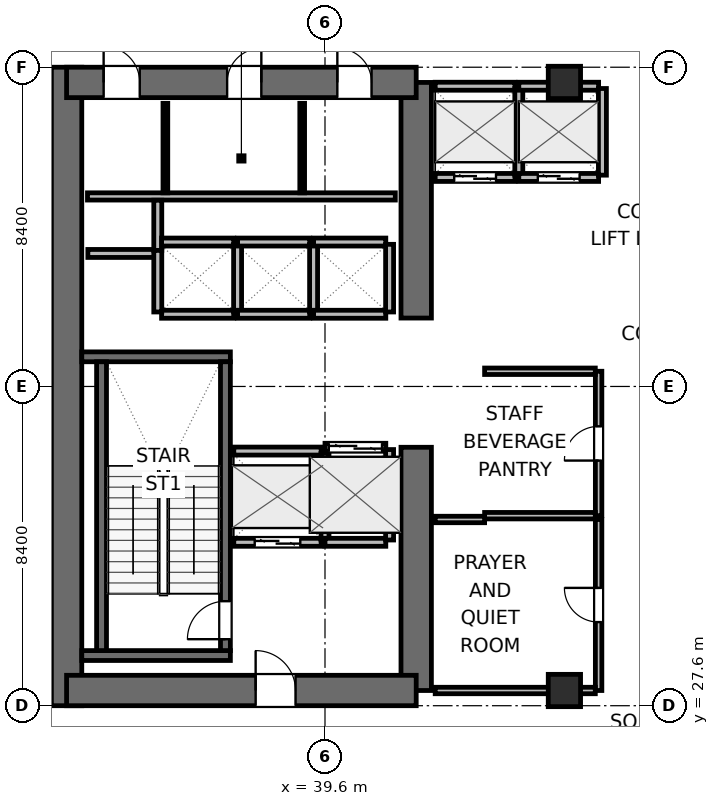
"""IFC4 building model, lengths in metres.
Left out: names, types, materials, properties, quantities, classifications, styles, units other than length and angle.
Written with IfcOpenShell. Run it as: python <this file> out.ifc"""

import sys

from ifc_helpers import new_model, si_unit, direction, frame, frame_2d, origin, origin_2d, place, context, subcontext, project, spatial, rectangle, extrude, element, fill, save


model = new_model("IFC4")
c1 = context("Model", 3, precision=1e-05, world=origin(), true_north=direction((0.0, 1.0)))
c2 = subcontext(c1, "Body", "Model", "MODEL_VIEW")
j1 = project(units=[si_unit("LENGTHUNIT", "METRE"), si_unit("PLANEANGLEUNIT", "RADIAN")], contexts=[c1])
p1 = place(None, origin())
s1 = spatial("IfcSite", under=j1, at=p1, CompositionType="ELEMENT")
p2 = place(p1, origin())
s2 = spatial("IfcBuilding", under=s1, at=p2, CompositionType="ELEMENT")
p3 = place(p2, frame((0.0, 0.0, 125.4)))
s3 = spatial("IfcBuildingStorey", under=s2, at=p3, CompositionType="ELEMENT", Elevation=125.4)
p4 = place(p3, frame((32.8, 27.6, 0.0), z_axis=(0.0, 0.0, 1.0), x_axis=(0.0, 1.0, 0.0)))
e1 = element("IfcWall", 1, at=p4, inside=s3, PredefinedType="SHEAR", context=c2, shape_type="SweptSolid", body=[
    extrude(rectangle(XDim=16.8, YDim=0.8, at=frame_2d((8.4, 0.0))), origin(), (0.0, 0.0, 1.0), 4.5),
])
p5 = place(p3, frame((42.0, 28.0, 0.0), z_axis=(0.0, 0.0, 1.0), x_axis=(0.0, 1.0, 0.0)))
e2 = element("IfcWall", 2, at=p5, inside=s3, PredefinedType="SHEAR", context=c2, shape_type="SweptSolid", body=[
    extrude(rectangle(XDim=6.4, YDim=0.8, at=frame_2d((3.2, 0.0))), origin(), (0.0, 0.0, 1.0), 4.5),
])
p6 = place(p3, frame((42.0, 37.8, 0.0), z_axis=(0.0, 0.0, 1.0), x_axis=(0.0, 1.0, 0.0)))
e3 = element("IfcWall", 3, at=p6, inside=s3, PredefinedType="SHEAR", context=c2, shape_type="SweptSolid", body=[
    extrude(rectangle(XDim=6.2, YDim=0.8, at=frame_2d((3.1, 0.0))), origin(), (0.0, 0.0, 1.0), 4.5),
])
p7 = place(p3, frame((32.8, 28.0, 0.0), z_axis=(0.0, 0.0, 1.0), x_axis=(1.0, 0.0, 0.0)))
e4 = element("IfcWall", 4, at=p7, inside=s3, PredefinedType="SHEAR", context=c2, shape_type="SweptSolid", body=[
    extrude(rectangle(XDim=9.2, YDim=0.8, at=frame_2d((4.6, 0.0))), origin(), (0.0, 0.0, 1.0), 4.5),
])
p8 = place(p7, frame((4.975, 0.0, 0.0)))
e5 = element("IfcOpeningElement", 5, at=p8, cuts=e4, PredefinedType="OPENING", context=c2, shape_type="SweptSolid", body=[
    extrude(rectangle(XDim=1.05, YDim=2.04, at=frame_2d((0.525, 1.02))), frame((0.0, 0.41, 0.0), z_axis=(0.0, -1.0, 0.0), x_axis=(1.0, 0.0, 0.0)), (0.0, 0.0, 1.0), 0.82),
])
p9 = place(p3, frame((32.8, 44.0, 0.0), z_axis=(0.0, 0.0, 1.0), x_axis=(1.0, 0.0, 0.0)))
e6 = element("IfcWall", 6, at=p9, inside=s3, PredefinedType="SHEAR", context=c2, shape_type="SweptSolid", body=[
    extrude(rectangle(XDim=9.2, YDim=0.8, at=frame_2d((4.6, 0.0))), origin(), (0.0, 0.0, 1.0), 4.5),
])
p10 = place(p9, frame((0.975, 0.0, 0.0)))
e7 = element("IfcOpeningElement", 7, at=p10, cuts=e6, PredefinedType="OPENING", context=c2, shape_type="SweptSolid", body=[
    extrude(rectangle(XDim=0.95, YDim=2.04, at=frame_2d((0.475, 1.02))), frame((0.0, 0.41, 0.0), z_axis=(0.0, -1.0, 0.0), x_axis=(1.0, 0.0, 0.0)), (0.0, 0.0, 1.0), 0.82),
])
p11 = place(p9, frame((4.225, 0.0, 0.0)))
e8 = element("IfcOpeningElement", 8, at=p11, cuts=e6, PredefinedType="OPENING", context=c2, shape_type="SweptSolid", body=[
    extrude(rectangle(XDim=0.9, YDim=2.02, at=frame_2d((0.45, 1.01))), frame((0.0, 0.41, 0.0), z_axis=(0.0, -1.0, 0.0), x_axis=(1.0, 0.0, 0.0)), (0.0, 0.0, 1.0), 0.82),
])
p12 = place(p9, frame((7.125, 0.0, 0.0)))
e9 = element("IfcOpeningElement", 9, at=p12, cuts=e6, PredefinedType="OPENING", context=c2, shape_type="SweptSolid", body=[
    extrude(rectangle(XDim=0.9, YDim=2.02, at=frame_2d((0.45, 1.01))), frame((0.0, 0.41, 0.0), z_axis=(0.0, -1.0, 0.0), x_axis=(1.0, 0.0, 0.0)), (0.0, 0.0, 1.0), 0.82),
])
for number, where, z_axis, x_axis in (
    (10, (33.2, 28.92, 0.0), (0.0, 0.0, 1.0), (1.0, 0.0, 0.0)),
    (11, (33.2, 36.78, 0.0), (0.0, 0.0, 1.0), (1.0, 0.0, 0.0)),
):
    element("IfcWall", number, at=place(p3, frame(where, z_axis=z_axis, x_axis=x_axis)), inside=s3, PredefinedType="SHEAR", context=c2, shape_type="SweptSolid", body=[
        extrude(rectangle(XDim=3.91, YDim=0.26, at=frame_2d((1.955, 0.0))), origin(), (0.0, 0.0, 1.0), 4.5),
    ])
p13 = place(p3, frame((33.72, 29.05, 0.0), z_axis=(0.0, 0.0, 1.0), x_axis=(0.0, 1.0, 0.0)))
e12 = element("IfcWall", 12, at=p13, inside=s3, PredefinedType="SHEAR", context=c2, shape_type="SweptSolid", body=[
    extrude(rectangle(XDim=7.6, YDim=0.26, at=frame_2d((3.8, 0.0))), origin(), (0.0, 0.0, 1.0), 4.5),
])
p14 = place(p3, frame((36.98, 29.05, 0.0), z_axis=(0.0, 0.0, 1.0), x_axis=(0.0, 1.0, 0.0)))
e13 = element("IfcWall", 13, at=p14, inside=s3, PredefinedType="SHEAR", context=c2, shape_type="SweptSolid", body=[
    extrude(rectangle(XDim=7.6, YDim=0.26, at=frame_2d((3.8, 0.0))), origin(), (0.0, 0.0, 1.0), 4.5),
])
p15 = place(p14, frame((0.3, 0.0, 0.0)))
e14 = element("IfcOpeningElement", 14, at=p15, cuts=e13, PredefinedType="OPENING", context=c2, shape_type="SweptSolid", body=[
    extrude(rectangle(XDim=1.0, YDim=2.04, at=frame_2d((0.5, 1.02))), frame((0.0, 0.14, 0.0), z_axis=(0.0, -1.0, 0.0), x_axis=(1.0, 0.0, 0.0)), (0.0, 0.0, 1.0), 0.28),
])
for number, where, z_axis, x_axis in (
    (15, (45.9, 28.0, 0.0), (0.0, 0.0, 1.0), (1.0, 0.0, 0.0)),
    (16, (45.9, 44.0, 0.0), (0.0, 0.0, 1.0), (1.0, 0.0, 0.0)),
):
    element("IfcColumn", number, at=place(p3, frame(where, z_axis=z_axis, x_axis=x_axis)), inside=s3, PredefinedType="COLUMN", context=c2, shape_type="SweptSolid", body=[
        extrude(rectangle(XDim=0.85, YDim=0.85, at=origin_2d()), origin(), (0.0, 0.0, 1.0), 4.5),
    ])
p16 = place(p3, frame((33.35, 41.0, 0.0), z_axis=(0.0, 0.0, 1.0), x_axis=(1.0, 0.0, 0.0)))
e17 = element("IfcWall", 17, at=p16, inside=s3, PredefinedType="PLUMBINGWALL", context=c2, shape_type="SweptSolid", body=[
    extrude(rectangle(XDim=8.1, YDim=0.19, at=frame_2d((4.05, 0.0))), origin(), (0.0, 0.0, 1.0), 4.24),
])
for number, where, z_axis, x_axis in (
    (18, (35.4, 41.095, 0.0), (0.0, 0.0, 1.0), (0.0, 1.0, 0.0)),
    (19, (39.0, 41.095, 0.0), (0.0, 0.0, 1.0), (0.0, 1.0, 0.0)),
):
    element("IfcWall", number, at=place(p3, frame(where, z_axis=z_axis, x_axis=x_axis)), inside=s3, PredefinedType="PARTITIONING", context=c2, shape_type="SweptSolid", body=[
        extrude(rectangle(XDim=2.355, YDim=0.125, at=frame_2d((1.177, 0.0))), origin(), (0.0, 0.0, 1.0), 4.24),
    ])
p17 = place(p3, frame((33.36, 39.5, 0.0), z_axis=(0.0, 0.0, 1.0), x_axis=(1.0, 0.0, 0.0)))
e20 = element("IfcWall", 20, at=p17, inside=s3, PredefinedType="PARTITIONING", context=c2, shape_type="SweptSolid", body=[
    extrude(rectangle(XDim=1.86, YDim=0.21, at=frame_2d((0.93, 0.0))), origin(), (0.0, 0.0, 1.0), 4.24),
])
p18 = place(p3, frame((35.2, 39.58, 0.0), z_axis=(0.0, 0.0, 1.0), x_axis=(0.0, 1.0, 0.0)))
e21 = element("IfcWall", 21, at=p18, inside=s3, PredefinedType="PARTITIONING", context=c2, shape_type="SweptSolid", body=[
    extrude(rectangle(XDim=1.32, YDim=0.21, at=frame_2d((0.66, 0.0))), origin(), (0.0, 0.0, 1.0), 4.24),
])
p19 = place(p3, frame((37.2, 31.9, 0.0), z_axis=(0.0, 0.0, 1.0), x_axis=(1.0, 0.0, 0.0)))
e22 = element("IfcWall", 22, at=p19, inside=s3, PredefinedType="PARTITIONING", context=c2, shape_type="SweptSolid", body=[
    extrude(rectangle(XDim=2.3, YDim=0.21, at=frame_2d((1.15, 0.0))), origin(), (0.0, 0.0, 1.0), 4.24),
])
p20 = place(p19, frame((0.55, 0.0, 0.0)))
e23 = element("IfcOpeningElement", 23, at=p20, cuts=e22, PredefinedType="OPENING", context=c2, shape_type="SweptSolid", body=[
    extrude(rectangle(XDim=1.2, YDim=2.04, at=frame_2d((0.6, 1.02))), frame((0.0, 0.115, 0.0), z_axis=(0.0, -1.0, 0.0), x_axis=(1.0, 0.0, 0.0)), (0.0, 0.0, 1.0), 0.23),
])
p21 = place(p3, frame((37.2, 34.3, 0.0), z_axis=(0.0, 0.0, 1.0), x_axis=(1.0, 0.0, 0.0)))
e24 = element("IfcWall", 24, at=p21, inside=s3, PredefinedType="PARTITIONING", context=c2, shape_type="SweptSolid", body=[
    extrude(rectangle(XDim=2.3, YDim=0.21, at=frame_2d((1.15, 0.0))), origin(), (0.0, 0.0, 1.0), 4.24),
])
p22 = place(p3, frame((39.6, 31.96, 0.0), z_axis=(0.0, 0.0, 1.0), x_axis=(0.0, 1.0, 0.0)))
e25 = element("IfcWall", 25, at=p22, inside=s3, PredefinedType="PARTITIONING", context=c2, shape_type="SweptSolid", body=[
    extrude(rectangle(XDim=2.28, YDim=0.21, at=frame_2d((1.14, 0.0))), origin(), (0.0, 0.0, 1.0), 4.24),
])
p23 = place(p3, frame((39.6, 34.4, 0.0), z_axis=(0.0, 0.0, 1.0), x_axis=(1.0, 0.0, 0.0)))
e26 = element("IfcWall", 26, at=p23, inside=s3, PredefinedType="PARTITIONING", context=c2, shape_type="SweptSolid", body=[
    extrude(rectangle(XDim=1.6, YDim=0.21, at=frame_2d((0.8, 0.0))), origin(), (0.0, 0.0, 1.0), 4.24),
])
p24 = place(p23, frame((0.1, 0.0, 0.0)))
e27 = element("IfcOpeningElement", 27, at=p24, cuts=e26, PredefinedType="OPENING", context=c2, shape_type="SweptSolid", body=[
    extrude(rectangle(XDim=1.4, YDim=2.06, at=frame_2d((0.7, 1.03))), frame((0.0, 0.115, 0.0), z_axis=(0.0, -1.0, 0.0), x_axis=(1.0, 0.0, 0.0)), (0.0, 0.0, 1.0), 0.23),
])
p25 = place(p3, frame((39.6, 31.9, 0.0), z_axis=(0.0, 0.0, 1.0), x_axis=(1.0, 0.0, 0.0)))
e28 = element("IfcWall", 28, at=p25, inside=s3, PredefinedType="PARTITIONING", context=c2, shape_type="SweptSolid", body=[
    extrude(rectangle(XDim=1.6, YDim=0.21, at=frame_2d((0.8, 0.0))), origin(), (0.0, 0.0, 1.0), 4.24),
])
p26 = place(p3, frame((41.3, 31.96, 0.0), z_axis=(0.0, 0.0, 1.0), x_axis=(0.0, 1.0, 0.0)))
e29 = element("IfcWall", 29, at=p26, inside=s3, PredefinedType="PARTITIONING", context=c2, shape_type="SweptSolid", body=[
    extrude(rectangle(XDim=2.38, YDim=0.21, at=frame_2d((1.19, 0.0))), origin(), (0.0, 0.0, 1.0), 4.24),
])
p27 = place(p3, frame((42.5, 41.5, 0.0), z_axis=(0.0, 0.0, 1.0), x_axis=(1.0, 0.0, 0.0)))
e30 = element("IfcWall", 30, at=p27, inside=s3, PredefinedType="PARTITIONING", context=c2, shape_type="SweptSolid", body=[
    extrude(rectangle(XDim=2.1, YDim=0.21, at=frame_2d((1.05, 0.0))), origin(), (0.0, 0.0, 1.0), 4.24),
])
p28 = place(p27, frame((0.5, 0.0, 0.0)))
e31 = element("IfcOpeningElement", 31, at=p28, cuts=e30, PredefinedType="OPENING", context=c2, shape_type="SweptSolid", body=[
    extrude(rectangle(XDim=1.1, YDim=2.04, at=frame_2d((0.55, 1.02))), frame((0.0, 0.115, 0.0), z_axis=(0.0, -1.0, 0.0), x_axis=(1.0, 0.0, 0.0)), (0.0, 0.0, 1.0), 0.23),
])
p29 = place(p3, frame((42.5, 43.9, 0.0), z_axis=(0.0, 0.0, 1.0), x_axis=(1.0, 0.0, 0.0)))
e32 = element("IfcWall", 32, at=p29, inside=s3, PredefinedType="PARTITIONING", context=c2, shape_type="SweptSolid", body=[
    extrude(rectangle(XDim=2.1, YDim=0.21, at=frame_2d((1.05, 0.0))), origin(), (0.0, 0.0, 1.0), 3.125),
])
p30 = place(p3, frame((44.7, 41.56, 0.0), z_axis=(0.0, 0.0, 1.0), x_axis=(0.0, 1.0, 0.0)))
e33 = element("IfcWall", 33, at=p30, inside=s3, PredefinedType="PARTITIONING", context=c2, shape_type="SweptSolid", body=[
    extrude(rectangle(XDim=2.28, YDim=0.21, at=frame_2d((1.14, 0.0))), origin(), (0.0, 0.0, 1.0), 4.24),
])
p31 = place(p3, frame((44.7, 41.5, 0.0), z_axis=(0.0, 0.0, 1.0), x_axis=(1.0, 0.0, 0.0)))
e34 = element("IfcWall", 34, at=p31, inside=s3, PredefinedType="PARTITIONING", context=c2, shape_type="SweptSolid", body=[
    extrude(rectangle(XDim=2.1, YDim=0.21, at=frame_2d((1.05, 0.0))), origin(), (0.0, 0.0, 1.0), 4.24),
])
p32 = place(p31, frame((0.5, 0.0, 0.0)))
e35 = element("IfcOpeningElement", 35, at=p32, cuts=e34, PredefinedType="OPENING", context=c2, shape_type="SweptSolid", body=[
    extrude(rectangle(XDim=1.1, YDim=2.04, at=frame_2d((0.55, 1.02))), frame((0.0, 0.115, 0.0), z_axis=(0.0, -1.0, 0.0), x_axis=(1.0, 0.0, 0.0)), (0.0, 0.0, 1.0), 0.23),
])
p33 = place(p3, frame((44.7, 43.9, 0.0), z_axis=(0.0, 0.0, 1.0), x_axis=(1.0, 0.0, 0.0)))
e36 = element("IfcWall", 36, at=p33, inside=s3, PredefinedType="PARTITIONING", context=c2, shape_type="SweptSolid", body=[
    extrude(rectangle(XDim=2.1, YDim=0.21, at=frame_2d((1.05, 0.0))), origin(), (0.0, 0.0, 1.0), 3.125),
])
p34 = place(p3, frame((46.9, 41.56, 0.0), z_axis=(0.0, 0.0, 1.0), x_axis=(0.0, 1.0, 0.0)))
e37 = element("IfcWall", 37, at=p34, inside=s3, PredefinedType="PARTITIONING", context=c2, shape_type="SweptSolid", body=[
    extrude(rectangle(XDim=2.28, YDim=0.21, at=frame_2d((1.14, 0.0))), origin(), (0.0, 0.0, 1.0), 4.24),
])
for number, where, z_axis, x_axis in (
    (38, (35.3, 37.9, 0.0), (0.0, 0.0, 1.0), (1.0, 0.0, 0.0)),
    (39, (35.3, 39.8, 0.0), (0.0, 0.0, 1.0), (1.0, 0.0, 0.0)),
):
    element("IfcWall", number, at=place(p3, frame(where, z_axis=z_axis, x_axis=x_axis)), inside=s3, PredefinedType="PARTITIONING", context=c2, shape_type="SweptSolid", body=[
        extrude(rectangle(XDim=1.9, YDim=0.21, at=frame_2d((0.95, 0.0))), origin(), (0.0, 0.0, 1.0), 4.24),
    ])
p35 = place(p3, frame((35.2, 37.96, 0.0), z_axis=(0.0, 0.0, 1.0), x_axis=(0.0, 1.0, 0.0)))
e40 = element("IfcWall", 40, at=p35, inside=s3, PredefinedType="PARTITIONING", context=c2, shape_type="SweptSolid", body=[
    extrude(rectangle(XDim=1.62, YDim=0.21, at=frame_2d((0.81, 0.0))), origin(), (0.0, 0.0, 1.0), 4.24),
])
p36 = place(p3, frame((37.3, 37.96, 0.0), z_axis=(0.0, 0.0, 1.0), x_axis=(0.0, 1.0, 0.0)))
e41 = element("IfcWall", 41, at=p36, inside=s3, PredefinedType="PARTITIONING", context=c2, shape_type="SweptSolid", body=[
    extrude(rectangle(XDim=1.78, YDim=0.21, at=frame_2d((0.89, 0.0))), origin(), (0.0, 0.0, 1.0), 4.24),
])
for number, where, z_axis, x_axis in (
    (42, (37.3, 37.9, 0.0), (0.0, 0.0, 1.0), (1.0, 0.0, 0.0)),
    (43, (37.3, 39.8, 0.0), (0.0, 0.0, 1.0), (1.0, 0.0, 0.0)),
):
    element("IfcWall", number, at=place(p3, frame(where, z_axis=z_axis, x_axis=x_axis)), inside=s3, PredefinedType="PARTITIONING", context=c2, shape_type="SweptSolid", body=[
        extrude(rectangle(XDim=1.9, YDim=0.21, at=frame_2d((0.95, 0.0))), origin(), (0.0, 0.0, 1.0), 4.24),
    ])
p37 = place(p3, frame((39.3, 37.96, 0.0), z_axis=(0.0, 0.0, 1.0), x_axis=(0.0, 1.0, 0.0)))
e44 = element("IfcWall", 44, at=p37, inside=s3, PredefinedType="PARTITIONING", context=c2, shape_type="SweptSolid", body=[
    extrude(rectangle(XDim=1.78, YDim=0.21, at=frame_2d((0.89, 0.0))), origin(), (0.0, 0.0, 1.0), 4.24),
])
for number, where, z_axis, x_axis in (
    (45, (39.3, 37.9, 0.0), (0.0, 0.0, 1.0), (1.0, 0.0, 0.0)),
    (46, (39.3, 39.8, 0.0), (0.0, 0.0, 1.0), (1.0, 0.0, 0.0)),
):
    element("IfcWall", number, at=place(p3, frame(where, z_axis=z_axis, x_axis=x_axis)), inside=s3, PredefinedType="PARTITIONING", context=c2, shape_type="SweptSolid", body=[
        extrude(rectangle(XDim=1.9, YDim=0.21, at=frame_2d((0.95, 0.0))), origin(), (0.0, 0.0, 1.0), 4.24),
    ])
p38 = place(p3, frame((41.3, 37.96, 0.0), z_axis=(0.0, 0.0, 1.0), x_axis=(0.0, 1.0, 0.0)))
e47 = element("IfcWall", 47, at=p38, inside=s3, PredefinedType="PARTITIONING", context=c2, shape_type="SweptSolid", body=[
    extrude(rectangle(XDim=1.78, YDim=0.21, at=frame_2d((0.89, 0.0))), origin(), (0.0, 0.0, 1.0), 4.24),
])
p39 = place(p3, frame((46.8, 32.6, 0.0), z_axis=(0.0, 0.0, 1.0), x_axis=(0.0, 1.0, 0.0)))
e48 = element("IfcWall", 48, at=p39, inside=s3, PredefinedType="PARTITIONING", context=c2, shape_type="SweptSolid", body=[
    extrude(rectangle(XDim=3.8, YDim=0.17, at=frame_2d((1.9, 0.0))), origin(), (0.0, 0.0, 1.0), 4.24),
])
p40 = place(p39, frame((1.45, 0.0, 0.0)))
e49 = element("IfcOpeningElement", 49, at=p40, cuts=e48, PredefinedType="OPENING", context=c2, shape_type="SweptSolid", body=[
    extrude(rectangle(XDim=0.9, YDim=2.02, at=frame_2d((0.45, 1.01))), frame((0.0, 0.095, 0.0), z_axis=(0.0, -1.0, 0.0), x_axis=(1.0, 0.0, 0.0)), (0.0, 0.0, 1.0), 0.19),
])
for number, where, z_axis, x_axis in (
    (50, (43.8, 32.6, 0.0), (0.0, 0.0, 1.0), (1.0, 0.0, 0.0)),
    (51, (43.8, 36.4, 0.0), (0.0, 0.0, 1.0), (1.0, 0.0, 0.0)),
):
    element("IfcWall", number, at=place(p3, frame(where, z_axis=z_axis, x_axis=x_axis)), inside=s3, PredefinedType="PARTITIONING", context=c2, shape_type="SweptSolid", body=[
        extrude(rectangle(XDim=2.913, YDim=0.17, at=frame_2d((1.457, 0.0))), origin(), (0.0, 0.0, 1.0), 4.24),
    ])
p41 = place(p3, frame((46.8, 28.0, 0.0), z_axis=(0.0, 0.0, 1.0), x_axis=(0.0, 1.0, 0.0)))
e52 = element("IfcWall", 52, at=p41, inside=s3, PredefinedType="PARTITIONING", context=c2, shape_type="SweptSolid", body=[
    extrude(rectangle(XDim=4.5, YDim=0.17, at=frame_2d((2.25, 0.0))), origin(), (0.0, 0.0, 1.0), 4.24),
])
p42 = place(p41, frame((1.8, 0.0, 0.0)))
e53 = element("IfcOpeningElement", 53, at=p42, cuts=e52, PredefinedType="OPENING", context=c2, shape_type="SweptSolid", body=[
    extrude(rectangle(XDim=0.9, YDim=2.02, at=frame_2d((0.45, 1.01))), frame((0.0, 0.095, 0.0), z_axis=(0.0, -1.0, 0.0), x_axis=(1.0, 0.0, 0.0)), (0.0, 0.0, 1.0), 0.19),
])
p43 = place(p3, frame((42.5, 28.0, 0.0), z_axis=(0.0, 0.0, 1.0), x_axis=(1.0, 0.0, 0.0)))
e54 = element("IfcWall", 54, at=p43, inside=s3, PredefinedType="PARTITIONING", context=c2, shape_type="SweptSolid", body=[
    extrude(rectangle(XDim=4.213, YDim=0.17, at=frame_2d((2.106, 0.0))), origin(), (0.0, 0.0, 1.0), 3.125),
])
p44 = place(p3, frame((42.5, 32.5, 0.0), z_axis=(0.0, 0.0, 1.0), x_axis=(1.0, 0.0, 0.0)))
e55 = element("IfcWall", 55, at=p44, inside=s3, PredefinedType="PARTITIONING", context=c2, shape_type="SweptSolid", body=[
    extrude(rectangle(XDim=1.3, YDim=0.17, at=frame_2d((0.65, 0.0))), origin(), (0.0, 0.0, 1.0), 4.24),
])
p45 = place(p15, origin())
e56 = element("IfcDoor", 56, at=p45, inside=s3, OperationType="SINGLE_SWING_LEFT", PredefinedType="DOOR", context=c2, shape_type="SweptSolid", body=[
    extrude(rectangle(XDim=1.0, YDim=2.04, at=frame_2d((0.5, 1.02))), frame((0.0, 0.025, 0.0), z_axis=(0.0, -1.0, 0.0), x_axis=(1.0, 0.0, 0.0)), (0.0, 0.0, 1.0), 0.05),
])
fill(e14, e56)
p46 = place(p20, origin())
e57 = element("IfcDoor", 57, at=p46, inside=s3, OperationType="DOUBLE_DOOR_SLIDING", PredefinedType="DOOR", context=c2, shape_type="SweptSolid", body=[
    extrude(rectangle(XDim=1.2, YDim=2.04, at=frame_2d((0.6, 1.02))), frame((0.0, 0.025, 0.0), z_axis=(0.0, -1.0, 0.0), x_axis=(1.0, 0.0, 0.0)), (0.0, 0.0, 1.0), 0.05),
])
fill(e23, e57)
p47 = place(p24, origin())
e58 = element("IfcDoor", 58, at=p47, inside=s3, OperationType="DOUBLE_DOOR_SLIDING", PredefinedType="DOOR", context=c2, shape_type="SweptSolid", body=[
    extrude(rectangle(XDim=1.4, YDim=2.06, at=frame_2d((0.7, 1.03))), frame((0.0, 0.025, 0.0), z_axis=(0.0, -1.0, 0.0), x_axis=(1.0, 0.0, 0.0)), (0.0, 0.0, 1.0), 0.05),
])
fill(e27, e58)
p48 = place(p28, origin())
e59 = element("IfcDoor", 59, at=p48, inside=s3, OperationType="DOUBLE_DOOR_SLIDING", PredefinedType="DOOR", context=c2, shape_type="SweptSolid", body=[
    extrude(rectangle(XDim=1.1, YDim=2.04, at=frame_2d((0.55, 1.02))), frame((0.0, 0.025, 0.0), z_axis=(0.0, -1.0, 0.0), x_axis=(1.0, 0.0, 0.0)), (0.0, 0.0, 1.0), 0.05),
])
fill(e31, e59)
p49 = place(p32, origin())
e60 = element("IfcDoor", 60, at=p49, inside=s3, OperationType="DOUBLE_DOOR_SLIDING", PredefinedType="DOOR", context=c2, shape_type="SweptSolid", body=[
    extrude(rectangle(XDim=1.1, YDim=2.04, at=frame_2d((0.55, 1.02))), frame((0.0, 0.025, 0.0), z_axis=(0.0, -1.0, 0.0), x_axis=(1.0, 0.0, 0.0)), (0.0, 0.0, 1.0), 0.05),
])
fill(e35, e60)
p50 = place(p8, origin())
e61 = element("IfcDoor", 61, at=p50, inside=s3, OperationType="SINGLE_SWING_LEFT", PredefinedType="DOOR", context=c2, shape_type="SweptSolid", body=[
    extrude(rectangle(XDim=1.05, YDim=2.04, at=frame_2d((0.525, 1.02))), frame((0.0, 0.025, 0.0), z_axis=(0.0, -1.0, 0.0), x_axis=(1.0, 0.0, 0.0)), (0.0, 0.0, 1.0), 0.05),
])
fill(e5, e61)
p51 = place(p10, origin())
e62 = element("IfcDoor", 62, at=p51, inside=s3, OperationType="SINGLE_SWING_LEFT", PredefinedType="DOOR", context=c2, shape_type="SweptSolid", body=[
    extrude(rectangle(XDim=0.95, YDim=2.04, at=frame_2d((0.475, 1.02))), frame((0.0, 0.025, 0.0), z_axis=(0.0, -1.0, 0.0), x_axis=(1.0, 0.0, 0.0)), (0.0, 0.0, 1.0), 0.05),
])
fill(e7, e62)
p52 = place(p11, origin())
e63 = element("IfcDoor", 63, at=p52, inside=s3, OperationType="SINGLE_SWING_RIGHT", PredefinedType="DOOR", context=c2, shape_type="SweptSolid", body=[
    extrude(rectangle(XDim=0.9, YDim=2.02, at=frame_2d((0.45, 1.01))), frame((0.0, 0.025, 0.0), z_axis=(0.0, -1.0, 0.0), x_axis=(1.0, 0.0, 0.0)), (0.0, 0.0, 1.0), 0.05),
])
fill(e8, e63)
p53 = place(p12, origin())
e64 = element("IfcDoor", 64, at=p53, inside=s3, OperationType="SINGLE_SWING_LEFT", PredefinedType="DOOR", context=c2, shape_type="SweptSolid", body=[
    extrude(rectangle(XDim=0.9, YDim=2.02, at=frame_2d((0.45, 1.01))), frame((0.0, 0.025, 0.0), z_axis=(0.0, -1.0, 0.0), x_axis=(1.0, 0.0, 0.0)), (0.0, 0.0, 1.0), 0.05),
])
fill(e9, e64)
p54 = place(p40, origin())
e65 = element("IfcDoor", 65, at=p54, inside=s3, OperationType="SINGLE_SWING_LEFT", PredefinedType="DOOR", context=c2, shape_type="SweptSolid", body=[
    extrude(rectangle(XDim=0.9, YDim=2.02, at=frame_2d((0.45, 1.01))), frame((0.0, 0.025, 0.0), z_axis=(0.0, -1.0, 0.0), x_axis=(1.0, 0.0, 0.0)), (0.0, 0.0, 1.0), 0.05),
])
fill(e49, e65)
p55 = place(p42, origin())
e66 = element("IfcDoor", 66, at=p55, inside=s3, OperationType="SINGLE_SWING_RIGHT", PredefinedType="DOOR", context=c2, shape_type="SweptSolid", body=[
    extrude(rectangle(XDim=0.9, YDim=2.02, at=frame_2d((0.45, 1.01))), frame((0.0, 0.025, 0.0), z_axis=(0.0, -1.0, 0.0), x_axis=(1.0, 0.0, 0.0)), (0.0, 0.0, 1.0), 0.05),
])
fill(e53, e66)
save(model, sys.argv[1])
